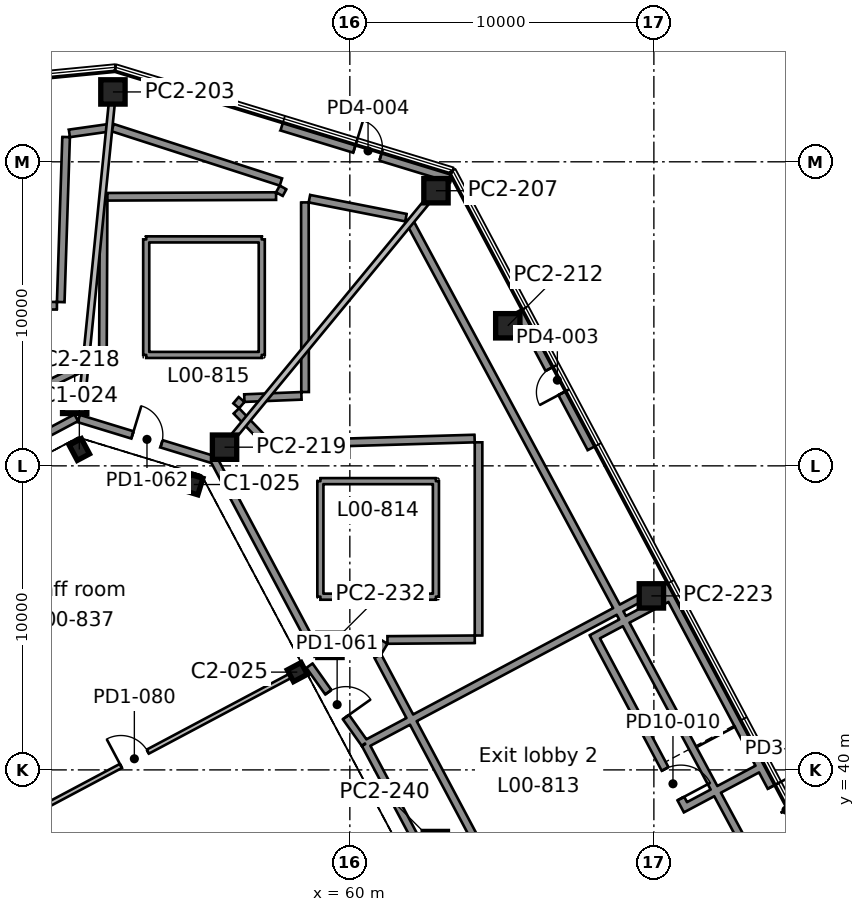
"""IFC4 building model, lengths in metres.
Left out: names, types, materials, properties, quantities, classifications, styles, units other than length and angle.
Written with IfcOpenShell. Run it as: python <this file> out.ifc"""

import sys

from ifc_helpers import new_model, si_unit, direction, frame, frame_2d, origin, origin_2d, place, context, subcontext, project, spatial, rectangle, i_section, extrude, element, fill, save


model = new_model("IFC4")
c1 = context("Model", 3, precision=1e-05, world=origin(), true_north=direction((0.0, 1.0)))
c2 = subcontext(c1, "Body", "Model", "MODEL_VIEW")
j1 = project(units=[si_unit("LENGTHUNIT", "METRE"), si_unit("PLANEANGLEUNIT", "RADIAN")], contexts=[c1])
p1 = place(None, origin())
s1 = spatial("IfcSite", under=j1, at=p1, CompositionType="ELEMENT")
p2 = place(p1, origin())
s2 = spatial("IfcBuilding", under=s1, at=p2, CompositionType="ELEMENT")
p3 = place(p2, origin())
s3 = spatial("IfcBuildingStorey", under=s2, at=p3, CompositionType="ELEMENT", Elevation=0.0)
p4 = place(p3, frame((58.272, 43.216, 0.0), z_axis=(0.0, 0.0, 1.0), x_axis=(-0.469471562786, 0.882947592859, 0.0)))
e1 = element("IfcColumn", 1, at=p4, inside=s3, PredefinedType="COLUMN", context=c2, shape_type="SweptSolid", body=[
    extrude(i_section(OverallWidth=0.437, OverallDepth=0.513, WebThickness=0.061, FlangeThickness=0.097, FilletRadius=0.015, at=origin_2d()), origin(), (0.0, 0.0, 1.0), 7.0),
])
for number, where, z_axis, x_axis in (
    (2, (54.867, 49.386, 0.0), (0.0, 0.0, 1.0), (-0.956, 0.292, 0.0)),
    (3, (51.103, 50.537, 0.0), (0.0, 0.0, 1.0), (-0.883, -0.469, 0.0)),
):
    element("IfcColumn", number, at=place(p3, frame(where, z_axis=z_axis, x_axis=x_axis)), inside=s3, PredefinedType="COLUMN", context=c2, shape_type="SweptSolid", body=[
        extrude(i_section(OverallWidth=0.455, OverallDepth=0.569, WebThickness=0.078, FlangeThickness=0.125, FilletRadius=0.015, at=origin_2d()), origin(), (0.0, 0.0, 1.0), 7.0),
    ])
for number, where, z_axis, x_axis in (
    (4, (62.811, 37.577, 0.0), (0.0, 0.0, 1.0), (1.0, 0.0, 0.0)),
    (5, (59.345, 44.096, 0.0), (0.0, 0.0, 1.0), (1.0, 0.0, 0.0)),
    (6, (69.918, 45.723, 0.0), (0.0, 0.0, 1.0), (1.0, 0.0, 0.0)),
    (7, (55.879, 50.614, 0.0), (0.0, 0.0, 1.0), (1.0, 0.0, 0.0)),
    (8, (50.95, 52.121, 0.0), (0.0, 0.0, 1.0), (1.0, 0.0, 0.0)),
    (9, (65.195, 54.607, 0.0), (0.0, 0.0, 1.0), (1.0, 0.0, 0.0)),
    (10, (62.833, 59.049, 0.0), (0.0, 0.0, 1.0), (1.0, 0.0, 0.0)),
    (11, (52.208, 62.298, 0.0), (0.0, 0.0, 1.0), (1.0, 0.0, 0.0)),
):
    element("IfcColumn", number, at=place(p3, frame(where, z_axis=z_axis, x_axis=x_axis)), inside=s3, PredefinedType="COLUMN", context=c2, shape_type="SweptSolid", body=[
        extrude(rectangle(XDim=0.8, YDim=0.8, at=origin_2d()), origin(), (0.0, 0.0, 1.0), 6.37),
    ])
p5 = place(p3, frame((75.189, 37.088, 0.0), z_axis=(0.0, 0.0, 1.0), x_axis=(-0.469475745628, 0.88294536879, 0.0)))
e12 = element("IfcWall", 12, at=p5, inside=s3, PredefinedType="SOLIDWALL", context=c2, shape_type="SweptSolid", body=[
    extrude(rectangle(XDim=10.209, YDim=0.4, at=frame_2d((5.104, 0.0))), origin(), (0.0, 0.0, 1.0), 6.37),
])
p6 = place(p5, frame((0.9, 0.0, 0.0)))
e13 = element("IfcOpeningElement", 13, at=p6, cuts=e12, PredefinedType="OPENING", context=c2, shape_type="SweptSolid", body=[
    extrude(rectangle(XDim=1.8, YDim=2.1, at=frame_2d((0.9, 1.05))), frame((0.0, 0.21, 0.0), z_axis=(0.0, -1.0, 0.0), x_axis=(1.0, 0.0, 0.0)), (0.0, 0.0, 1.0), 0.42),
])
p7 = place(p3, frame((68.0, 50.61, 0.0), z_axis=(0.0, 0.0, 1.0), x_axis=(-0.469475745628, 0.88294536879, 0.0)))
e14 = element("IfcWall", 14, at=p7, inside=s3, PredefinedType="SOLIDWALL", context=c2, shape_type="SweptSolid", body=[
    extrude(rectangle(XDim=5.104, YDim=0.4, at=frame_2d((2.552, 0.0))), origin(), (0.0, 0.0, 1.0), 6.37),
])
p8 = place(p7, frame((2.052, 0.0, 0.0)))
e15 = element("IfcOpeningElement", 15, at=p8, cuts=e14, PredefinedType="OPENING", context=c2, shape_type="SweptSolid", body=[
    extrude(rectangle(XDim=0.9, YDim=2.1, at=frame_2d((0.45, 1.05))), frame((0.0, 0.21, 0.0), z_axis=(0.0, -1.0, 0.0), x_axis=(1.0, 0.0, 0.0)), (0.0, 0.0, 1.0), 0.42),
])
p9 = place(p3, frame((63.361, 59.515, 0.0), z_axis=(0.0, 0.0, 1.0), x_axis=(-0.956314551747, 0.292339662237, 0.0)))
e16 = element("IfcWall", 16, at=p9, inside=s3, PredefinedType="SOLIDWALL", context=c2, shape_type="SweptSolid", body=[
    extrude(rectangle(XDim=5.838, YDim=0.4, at=frame_2d((2.919, 0.0))), origin(), (0.0, 0.0, 1.0), 6.37),
])
p10 = place(p9, frame((2.438, 0.0, 0.0)))
e17 = element("IfcOpeningElement", 17, at=p10, cuts=e16, PredefinedType="OPENING", context=c2, shape_type="SweptSolid", body=[
    extrude(rectangle(XDim=0.9, YDim=2.1, at=frame_2d((0.45, 1.05))), frame((0.0, 0.21, 0.0), z_axis=(0.0, -1.0, 0.0), x_axis=(1.0, 0.0, 0.0)), (0.0, 0.0, 1.0), 0.42),
])
p11 = place(p3, frame((64.104, 50.899, 7.0), z_axis=(0.0, 0.0, 1.0), x_axis=(-0.999557331357, -0.029751324843, 0.0)))
e18 = element("IfcWall", 18, at=p11, inside=s3, PredefinedType="STANDARD", context=c2, shape_type="SweptSolid", body=[
    extrude(rectangle(XDim=6.721, YDim=0.25, at=frame_2d((3.36, 0.0))), origin(), (0.0, 0.0, 1.0), 0.65),
])
p12 = place(p3, frame((57.292, 50.737, 7.0), z_axis=(0.0, 0.0, 1.0), x_axis=(-0.692037764772, 0.721861297016, 0.0)))
e19 = element("IfcWall", 19, at=p12, inside=s3, PredefinedType="STANDARD", context=c2, shape_type="SweptSolid", body=[
    extrude(rectangle(XDim=1.482, YDim=0.25, at=frame_2d((0.741, 0.0))), origin(), (0.0, 0.0, 1.0), 0.65),
])
p13 = place(p3, frame((56.262, 51.974, 7.0), z_axis=(0.0, 0.0, 1.0), x_axis=(0.646899057013, 0.762575642173, 0.0)))
e20 = element("IfcWall", 20, at=p13, inside=s3, PredefinedType="STANDARD", context=c2, shape_type="SweptSolid", body=[
    extrude(rectangle(XDim=0.274, YDim=0.25, at=frame_2d((0.137, 0.0))), origin(), (0.0, 0.0, 1.0), 0.65),
])
p14 = place(p3, frame((56.53, 52.228, 7.0), z_axis=(0.0, 0.0, 1.0), x_axis=(0.999199505682, 0.040004347816, 0.0)))
e21 = element("IfcWall", 21, at=p14, inside=s3, PredefinedType="STANDARD", context=c2, shape_type="SweptSolid", body=[
    extrude(rectangle(XDim=1.88, YDim=0.25, at=frame_2d((0.94, 0.0))), origin(), (0.0, 0.0, 1.0), 0.65),
])
p15 = place(p3, frame((58.528, 52.428, 7.0), z_axis=(0.0, 0.0, 1.0), x_axis=(-0.001096104254, 0.999999399278, 0.0)))
e22 = element("IfcWall", 22, at=p15, inside=s3, PredefinedType="STANDARD", context=c2, shape_type="SweptSolid", body=[
    extrude(rectangle(XDim=6.237, YDim=0.25, at=frame_2d((3.118, 0.0))), origin(), (0.0, 0.0, 1.0), 0.65),
])
p16 = place(p3, frame((58.67, 58.787, 7.0), z_axis=(0.0, 0.0, 1.0), x_axis=(0.981202419551, -0.192981376996, 0.0)))
e23 = element("IfcWall", 23, at=p16, inside=s3, PredefinedType="STANDARD", context=c2, shape_type="SweptSolid", body=[
    extrude(rectangle(XDim=3.236, YDim=0.25, at=frame_2d((1.618, 0.0))), origin(), (0.0, 0.0, 1.0), 0.65),
])
p17 = place(p3, frame((61.932, 58.099, 7.0), z_axis=(0.0, 0.0, 1.0), x_axis=(0.473465440849, -0.880812395645, 0.0)))
e24 = element("IfcWall", 24, at=p17, inside=s3, PredefinedType="STANDARD", context=c2, shape_type="SweptSolid", body=[
    extrude(rectangle(XDim=25.663, YDim=0.25, at=frame_2d((12.831, 0.0))), origin(), (0.0, 0.0, 1.0), 0.65),
])
p18 = place(p3, frame((67.24, 31.857, 7.0), z_axis=(0.0, 0.0, 1.0), x_axis=(-0.469474314258, 0.88294612987, 0.0)))
e25 = element("IfcWall", 25, at=p18, inside=s3, PredefinedType="STANDARD", context=c2, shape_type="SweptSolid", body=[
    extrude(rectangle(XDim=13.462, YDim=0.25, at=frame_2d((6.731, 0.0))), origin(), (0.0, 0.0, 1.0), 0.65),
])
p19 = place(p3, frame((60.923, 43.866, 7.0), z_axis=(0.0, 0.0, 1.0), x_axis=(0.515472974842, 0.856905836255, 0.0)))
e26 = element("IfcWall", 26, at=p19, inside=s3, PredefinedType="STANDARD", context=c2, shape_type="SweptSolid", body=[
    extrude(rectangle(XDim=0.404, YDim=0.25, at=frame_2d((0.202, 0.0))), origin(), (0.0, 0.0, 1.0), 0.65),
])
p20 = place(p3, frame((61.237, 44.273, 7.0), z_axis=(0.0, 0.0, 1.0), x_axis=(0.999970067376, 0.007737205691, 0.0)))
e27 = element("IfcWall", 27, at=p20, inside=s3, PredefinedType="STANDARD", context=c2, shape_type="SweptSolid", body=[
    extrude(rectangle(XDim=2.871, YDim=0.25, at=frame_2d((1.436, 0.0))), origin(), (0.0, 0.0, 1.0), 0.65),
])
p21 = place(p3, frame((64.233, 44.42, 7.0), z_axis=(0.0, 0.0, 1.0), x_axis=(0.0, 1.0, 0.0)))
e28 = element("IfcWall", 28, at=p21, inside=s3, PredefinedType="STANDARD", context=c2, shape_type="SweptSolid", body=[
    extrude(rectangle(XDim=6.353, YDim=0.25, at=frame_2d((3.177, 0.0))), origin(), (0.0, 0.0, 1.0), 0.65),
])
p22 = place(p3, frame((51.808, 53.523, 7.0), z_axis=(0.0, 0.0, 1.0), x_axis=(-0.89970966322, -0.436488856569, 0.0)))
e29 = element("IfcWall", 29, at=p22, inside=s3, PredefinedType="STANDARD", context=c2, shape_type="SweptSolid", body=[
    extrude(rectangle(XDim=13.462, YDim=0.25, at=frame_2d((6.731, 0.0))), origin(), (0.0, 0.0, 1.0), 0.65),
])
p23 = place(p3, frame((44.066, 55.289, 7.0), z_axis=(0.0, 0.0, 1.0), x_axis=(0.999993223506, -0.003681432135, 0.0)))
e30 = element("IfcWall", 30, at=p23, inside=s3, PredefinedType="STANDARD", context=c2, shape_type="SweptSolid", body=[
    extrude(rectangle(XDim=6.3, YDim=0.25, at=frame_2d((3.15, 0.0))), origin(), (0.0, 0.0, 1.0), 0.65),
])
p24 = place(p3, frame((50.491, 55.387, 7.0), z_axis=(0.0, 0.0, 1.0), x_axis=(0.032503507659, 0.999471621403, 0.0)))
e31 = element("IfcWall", 31, at=p24, inside=s3, PredefinedType="STANDARD", context=c2, shape_type="SweptSolid", body=[
    extrude(rectangle(XDim=5.431, YDim=0.25, at=frame_2d((2.715, 0.0))), origin(), (0.0, 0.0, 1.0), 0.65),
])
p25 = place(p3, frame((50.775, 60.934, 7.0), z_axis=(0.0, 0.0, 1.0), x_axis=(0.990122021984, 0.140208350613, 0.0)))
e32 = element("IfcWall", 32, at=p25, inside=s3, PredefinedType="STANDARD", context=c2, shape_type="SweptSolid", body=[
    extrude(rectangle(XDim=1.381, YDim=0.25, at=frame_2d((0.69, 0.0))), origin(), (0.0, 0.0, 1.0), 0.65),
])
p26 = place(p3, frame((52.198, 61.123, 7.0), z_axis=(0.0, 0.0, 1.0), x_axis=(0.951593022615, -0.307360894243, 0.0)))
e33 = element("IfcWall", 33, at=p26, inside=s3, PredefinedType="STANDARD", context=c2, shape_type="SweptSolid", body=[
    extrude(rectangle(XDim=5.816, YDim=0.25, at=frame_2d((2.908, 0.0))), origin(), (0.0, 0.0, 1.0), 0.65),
])
p27 = place(p3, frame((57.804, 59.156, 7.0), z_axis=(0.0, 0.0, 1.0), x_axis=(-0.48233015337, -0.875989510868, 0.0)))
e34 = element("IfcWall", 34, at=p27, inside=s3, PredefinedType="STANDARD", context=c2, shape_type="SweptSolid", body=[
    extrude(rectangle(XDim=0.25, YDim=0.25, at=frame_2d((0.125, 0.0))), origin(), (0.0, 0.0, 1.0), 0.65),
])
p28 = place(p3, frame((57.574, 58.872, 7.0), z_axis=(0.0, 0.0, 1.0), x_axis=(-0.999991626198, -0.004092374972, 0.0)))
e35 = element("IfcWall", 35, at=p28, inside=s3, PredefinedType="STANDARD", context=c2, shape_type="SweptSolid", body=[
    extrude(rectangle(XDim=5.548, YDim=0.25, at=frame_2d((2.774, 0.0))), origin(), (0.0, 0.0, 1.0), 0.65),
])
p29 = place(p3, frame((51.901, 58.727, 7.0), z_axis=(0.0, 0.0, 1.0), x_axis=(-0.004458890324, -0.999990059099, 0.0)))
e36 = element("IfcWall", 36, at=p29, inside=s3, PredefinedType="STANDARD", context=c2, shape_type="SweptSolid", body=[
    extrude(rectangle(XDim=5.092, YDim=0.25, at=frame_2d((2.546, 0.0))), origin(), (0.0, 0.0, 1.0), 0.65),
])
for number, where, z_axis, x_axis in (
    (37, (62.831, 45.697, 6.92), (0.0, 0.0, 1.0), (-1.0, 0.0, 0.0)),
    (38, (59.031, 45.697, 6.92), (0.0, 0.0, 1.0), (0.0, 1.0, 0.0)),
    (39, (59.031, 49.497, 6.92), (0.0, 0.0, 1.0), (1.0, 0.0, 0.0)),
    (40, (62.831, 49.497, 6.92), (0.0, 0.0, 1.0), (0.0, -1.0, 0.0)),
    (41, (57.103, 53.648, 6.92), (0.0, 0.0, 1.0), (-1.0, 0.0, 0.0)),
    (42, (53.303, 53.648, 6.92), (0.0, 0.0, 1.0), (0.0, 1.0, 0.0)),
    (43, (53.303, 57.448, 6.92), (0.0, 0.0, 1.0), (1.0, 0.0, 0.0)),
    (44, (57.103, 57.448, 6.92), (0.0, 0.0, 1.0), (0.0, -1.0, 0.0)),
):
    element("IfcWall", number, at=place(p3, frame(where, z_axis=z_axis, x_axis=x_axis)), inside=s3, PredefinedType="SOLIDWALL", context=c2, shape_type="SweptSolid", body=[
        extrude(rectangle(XDim=3.8, YDim=0.2, at=frame_2d((1.9, 0.0))), origin(), (0.0, 0.0, 1.0), 0.18),
    ])
p30 = place(p3, frame((69.518, 45.635, 0.0), z_axis=(0.0, 0.0, 1.0), x_axis=(-0.882956154604, -0.46945546013, 0.0)))
e45 = element("IfcWall", 45, at=p30, inside=s3, PredefinedType="SOLIDWALL", context=c2, shape_type="SweptSolid", body=[
    extrude(rectangle(XDim=10.206, YDim=0.25, at=frame_2d((5.103, 0.0))), origin(), (0.0, 0.0, 1.0), 6.37),
])
p31 = place(p3, frame((60.505, 40.848, 0.0), z_axis=(0.0, 0.0, 1.0), x_axis=(0.469448377302, -0.882959920409, 0.0)))
e46 = element("IfcWall", 46, at=p31, inside=s3, PredefinedType="SOLIDWALL", context=c2, shape_type="SweptSolid", body=[
    extrude(rectangle(XDim=4.059, YDim=0.25, at=frame_2d((2.03, 0.0))), origin(), (0.0, 0.0, 1.0), 6.37),
])
p32 = place(p3, frame((62.503, 58.649, 0.0), z_axis=(0.0, 0.0, 1.0), x_axis=(-0.636071289124, -0.771630296938, 0.0)))
e47 = element("IfcWall", 47, at=p32, inside=s3, PredefinedType="PARTITIONING", context=c2, shape_type="SweptSolid", body=[
    extrude(rectangle(XDim=9.895, YDim=0.2, at=frame_2d((4.947, 0.0))), origin(), (0.0, 0.0, 1.0), 6.37),
])
p33 = place(p3, frame((58.672, 43.428, 0.0), z_axis=(0.0, 0.0, 1.0), x_axis=(0.578928632739, -0.815378217881, 0.0)))
e48 = element("IfcWall", 48, at=p33, inside=s3, PredefinedType="SOLIDWALL", context=c2, shape_type="SweptSolid", body=[
    extrude(rectangle(XDim=3.143, YDim=0.25, at=frame_2d((1.572, 0.0))), origin(), (0.0, 0.0, 1.0), 6.37),
])
p34 = place(p33, frame((1.072, 0.0, 0.0)))
e49 = element("IfcOpeningElement", 49, at=p34, cuts=e48, PredefinedType="OPENING", context=c2, shape_type="SweptSolid", body=[
    extrude(rectangle(XDim=1.0, YDim=2.1, at=frame_2d((0.5, 1.05))), frame((0.0, 0.135, 0.0), z_axis=(0.0, -1.0, 0.0), x_axis=(1.0, 0.0, 0.0)), (0.0, 0.0, 1.0), 0.27),
])
p35 = place(p3, frame((55.535, 50.196, 0.0), z_axis=(0.0, 0.0, 1.0), x_axis=(0.469471385401, -0.882947687176, 0.0)))
e50 = element("IfcWall", 50, at=p35, inside=s3, PredefinedType="SOLIDWALL", context=c2, shape_type="SweptSolid", body=[
    extrude(rectangle(XDim=7.264, YDim=0.25, at=frame_2d((3.632, 0.0))), origin(), (0.0, 0.0, 1.0), 6.37),
])
p36 = place(p3, frame((52.168, 61.898, 0.0), z_axis=(0.0, 0.0, 1.0), x_axis=(-0.100124403506, -0.994974926228, 0.0)))
e51 = element("IfcWall", 51, at=p36, inside=s3, PredefinedType="PARTITIONING", context=c2, shape_type="SweptSolid", body=[
    extrude(rectangle(XDim=9.424, YDim=0.2, at=frame_2d((4.712, 0.0))), origin(), (0.0, 0.0, 1.0), 6.37),
])
p37 = place(p3, frame((51.087, 51.556, 0.0), z_axis=(0.0, 0.0, 1.0), x_axis=(0.956310816829, -0.292351879788, 0.0)))
e52 = element("IfcWall", 52, at=p37, inside=s3, PredefinedType="SOLIDWALL", context=c2, shape_type="SweptSolid", body=[
    extrude(rectangle(XDim=4.651, YDim=0.25, at=frame_2d((2.326, 0.0))), origin(), (0.0, 0.0, 1.0), 6.37),
])
p38 = place(p37, frame((1.844, 0.0, 0.0)))
e53 = element("IfcOpeningElement", 53, at=p38, cuts=e52, PredefinedType="OPENING", context=c2, shape_type="SweptSolid", body=[
    extrude(rectangle(XDim=1.0, YDim=2.1, at=frame_2d((0.5, 1.05))), frame((0.0, 0.135, 0.0), z_axis=(0.0, -1.0, 0.0), x_axis=(1.0, 0.0, 0.0)), (0.0, 0.0, 1.0), 0.27),
])
p39 = place(p3, frame((44.072, 47.897, 0.0), z_axis=(0.0, 0.0, 1.0), x_axis=(0.882948932855, 0.469469042612, 0.0)))
e54 = element("IfcWall", 54, at=p39, inside=s3, PredefinedType="SOLIDWALL", context=c2, shape_type="SweptSolid", body=[
    extrude(rectangle(XDim=7.849, YDim=0.25, at=frame_2d((3.924, 0.0))), origin(), (0.0, 0.0, 1.0), 6.37),
])
p40 = place(p39, frame((3.424, 0.0, 0.0)))
e55 = element("IfcOpeningElement", 55, at=p40, cuts=e54, PredefinedType="OPENING", context=c2, shape_type="SweptSolid", body=[
    extrude(rectangle(XDim=1.0, YDim=2.1, at=frame_2d((0.5, 1.05))), frame((0.0, 0.135, 0.0), z_axis=(0.0, -1.0, 0.0), x_axis=(1.0, 0.0, 0.0)), (0.0, 0.0, 1.0), 0.27),
])
p41 = place(p3, frame((58.046, 43.095, 0.0), z_axis=(0.0, 0.0, 1.0), x_axis=(-0.882944872937, -0.469476678179, 0.0)))
e56 = element("IfcWall", 56, at=p41, inside=s3, PredefinedType="PARTITIONING", context=c2, shape_type="SweptSolid", body=[
    extrude(rectangle(XDim=11.586, YDim=0.15, at=frame_2d((5.793, 0.0))), origin(), (0.0, 0.0, 1.0), 6.55),
])
p42 = place(p41, frame((5.314, 0.0, 0.0)))
e57 = element("IfcOpeningElement", 57, at=p42, cuts=e56, PredefinedType="OPENING", context=c2, shape_type="SweptSolid", body=[
    extrude(rectangle(XDim=1.0, YDim=2.1, at=frame_2d((0.5, 1.05))), frame((0.0, 0.085, 0.0), z_axis=(0.0, -1.0, 0.0), x_axis=(1.0, 0.0, 0.0)), (0.0, 0.0, 1.0), 0.17),
])
p43 = place(p3, frame((73.4, 40.027, 0.0), z_axis=(0.0, 0.0, 1.0), x_axis=(-0.882970050864, -0.469429322983, 0.0)))
e58 = element("IfcWall", 58, at=p43, inside=s3, PredefinedType="SOLIDWALL", context=c2, shape_type="SweptSolid", body=[
    extrude(rectangle(XDim=2.8, YDim=0.25, at=frame_2d((1.4, 0.0))), origin(), (0.0, 0.0, 1.0), 6.37),
])
p44 = place(p3, frame((70.419, 45.633, 0.0), z_axis=(0.0, 0.0, 1.0), x_axis=(-0.882950835185, -0.469465464807, 0.0)))
e59 = element("IfcWall", 59, at=p44, inside=s3, PredefinedType="SOLIDWALL", context=c2, shape_type="SweptSolid", body=[
    extrude(rectangle(XDim=2.8, YDim=0.25, at=frame_2d((1.4, 0.0))), origin(), (0.0, 0.0, 1.0), 6.37),
])
p45 = place(p3, frame((71.097, 38.66, 0.0), z_axis=(0.0, 0.0, 1.0), x_axis=(-0.469489660743, 0.882937969766, 0.0)))
e60 = element("IfcWall", 60, at=p45, inside=s3, PredefinedType="SOLIDWALL", context=c2, shape_type="SweptSolid", body=[
    extrude(rectangle(XDim=6.6, YDim=0.25, at=frame_2d((3.3, 0.0))), origin(), (0.0, 0.0, 1.0), 6.37),
])
p46 = place(p45, frame((0.45, 0.0, 0.0)))
e61 = element("IfcOpeningElement", 61, at=p46, cuts=e60, PredefinedType="OPENING", context=c2, shape_type="SweptSolid", body=[
    extrude(rectangle(XDim=1.1, YDim=2.1, at=frame_2d((0.55, 1.05))), frame((0.0, 0.135, 0.0), z_axis=(0.0, -1.0, 0.0), x_axis=(1.0, 0.0, 0.0)), (0.0, 0.0, 1.0), 0.27),
])
p47 = place(p6, frame((1.8, 0.0, 0.0), z_axis=(0.0, 0.0, 1.0), x_axis=(-1.0, 0.0, 0.0)))
e62 = element("IfcDoor", 62, at=p47, inside=s3, OperationType="DOUBLE_DOOR_SINGLE_SWING", PredefinedType="DOOR", context=c2, shape_type="SweptSolid", body=[
    extrude(rectangle(XDim=1.8, YDim=2.1, at=frame_2d((0.9, 1.05))), frame((0.0, 0.025, 0.0), z_axis=(0.0, -1.0, 0.0), x_axis=(1.0, 0.0, 0.0)), (0.0, 0.0, 1.0), 0.05),
])
fill(e13, e62)
p48 = place(p8, origin())
e63 = element("IfcDoor", 63, at=p48, inside=s3, OperationType="SINGLE_SWING_LEFT", PredefinedType="DOOR", context=c2, shape_type="SweptSolid", body=[
    extrude(rectangle(XDim=0.9, YDim=2.1, at=frame_2d((0.45, 1.05))), frame((0.0, 0.025, 0.0), z_axis=(0.0, -1.0, 0.0), x_axis=(1.0, 0.0, 0.0)), (0.0, 0.0, 1.0), 0.05),
])
fill(e15, e63)
p49 = place(p10, frame((0.9, 0.0, 0.0), z_axis=(0.0, 0.0, 1.0), x_axis=(-1.0, 0.0, 0.0)))
e64 = element("IfcDoor", 64, at=p49, inside=s3, OperationType="SINGLE_SWING_LEFT", PredefinedType="DOOR", context=c2, shape_type="SweptSolid", body=[
    extrude(rectangle(XDim=0.9, YDim=2.1, at=frame_2d((0.45, 1.05))), frame((0.0, 0.025, 0.0), z_axis=(0.0, -1.0, 0.0), x_axis=(1.0, 0.0, 0.0)), (0.0, 0.0, 1.0), 0.05),
])
fill(e17, e64)
p50 = place(p3, frame((0.0, 0.0, 6.37)))
p51 = place(p50, frame((60.931, 47.597, 0.0)))
p52 = place(p51, frame((0.0, 0.0, 0.5)))
e65 = element("IfcWindow", 65, at=p52, inside=s3, PartitioningType="SINGLE_PANEL", PredefinedType="SKYLIGHT", context=c2, shape_type="SweptSolid", body=[
    extrude(rectangle(XDim=3.6, YDim=3.6, at=origin_2d()), origin(), (0.0, 0.0, 1.0), 0.05),
])
p53 = place(p50, frame((55.203, 55.548, 0.0)))
p54 = place(p53, frame((0.0, 0.0, 0.5)))
e66 = element("IfcWindow", 66, at=p54, inside=s3, PartitioningType="SINGLE_PANEL", PredefinedType="SKYLIGHT", context=c2, shape_type="SweptSolid", body=[
    extrude(rectangle(XDim=3.6, YDim=3.6, at=origin_2d()), origin(), (0.0, 0.0, 1.0), 0.05),
])
p55 = place(p46, frame((1.1, 0.0, 0.0), z_axis=(0.0, 0.0, 1.0), x_axis=(-1.0, 0.0, 0.0)))
e67 = element("IfcDoor", 67, at=p55, inside=s3, OperationType="SINGLE_SWING_RIGHT", PredefinedType="DOOR", context=c2, shape_type="SweptSolid", body=[
    extrude(rectangle(XDim=1.1, YDim=2.1, at=frame_2d((0.55, 1.05))), frame((0.0, 0.025, 0.0), z_axis=(0.0, -1.0, 0.0), x_axis=(1.0, 0.0, 0.0)), (0.0, 0.0, 1.0), 0.05),
])
fill(e61, e67)
p56 = place(p42, frame((1.0, 0.0, 0.0), z_axis=(0.0, 0.0, 1.0), x_axis=(-1.0, 0.0, 0.0)))
e68 = element("IfcDoor", 68, at=p56, inside=s3, OperationType="SINGLE_SWING_LEFT", PredefinedType="DOOR", context=c2, shape_type="SweptSolid", body=[
    extrude(rectangle(XDim=1.0, YDim=2.1, at=frame_2d((0.5, 1.05))), frame((0.0, 0.025, 0.0), z_axis=(0.0, -1.0, 0.0), x_axis=(1.0, 0.0, 0.0)), (0.0, 0.0, 1.0), 0.05),
])
fill(e57, e68)
p57 = place(p34, origin())
e69 = element("IfcDoor", 69, at=p57, inside=s3, OperationType="SINGLE_SWING_RIGHT", PredefinedType="DOOR", context=c2, shape_type="SweptSolid", body=[
    extrude(rectangle(XDim=1.0, YDim=2.1, at=frame_2d((0.5, 1.05))), frame((0.0, 0.025, 0.0), z_axis=(0.0, -1.0, 0.0), x_axis=(1.0, 0.0, 0.0)), (0.0, 0.0, 1.0), 0.05),
])
fill(e49, e69)
p58 = place(p38, origin())
e70 = element("IfcDoor", 70, at=p58, inside=s3, OperationType="SINGLE_SWING_LEFT", PredefinedType="DOOR", context=c2, shape_type="SweptSolid", body=[
    extrude(rectangle(XDim=1.0, YDim=2.1, at=frame_2d((0.5, 1.05))), frame((0.0, 0.025, 0.0), z_axis=(0.0, -1.0, 0.0), x_axis=(1.0, 0.0, 0.0)), (0.0, 0.0, 1.0), 0.05),
])
fill(e53, e70)
save(model, sys.argv[1])
